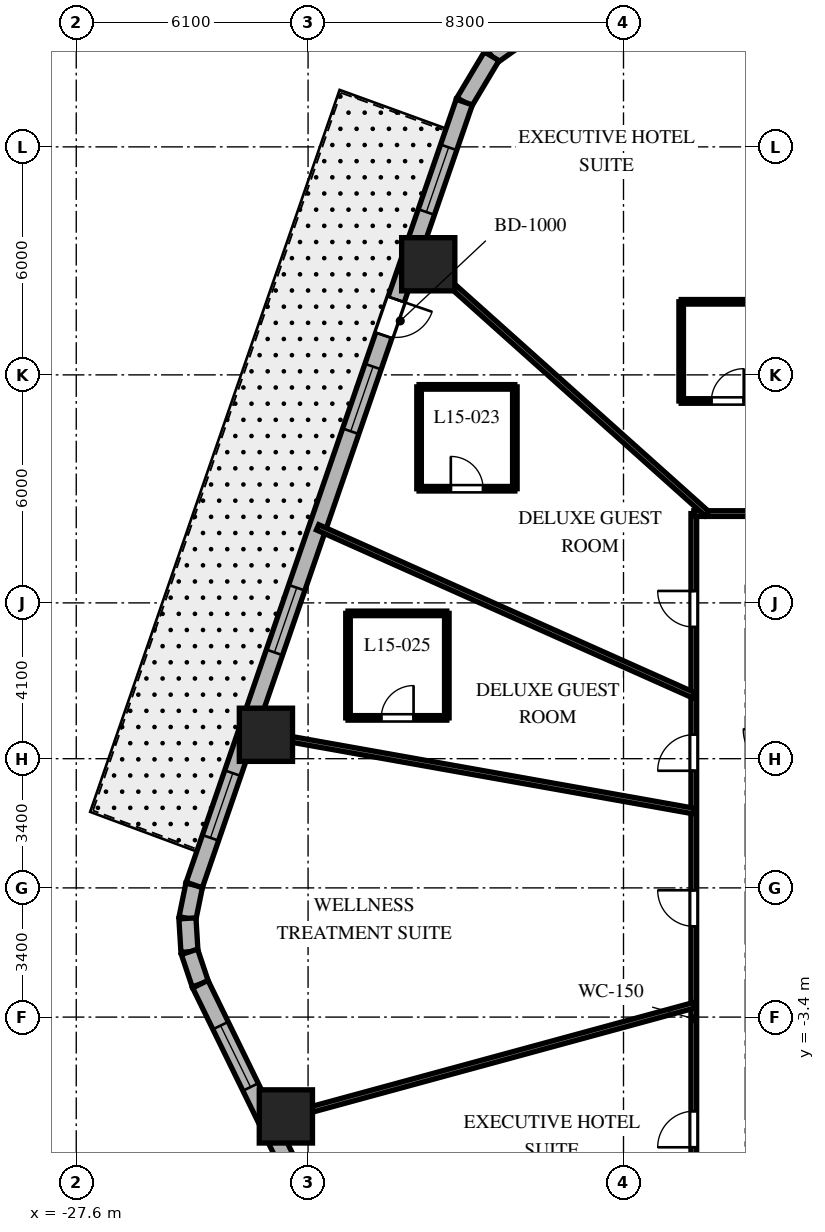
"""IFC4 building model, lengths in metres.
Left out: names, types, materials, properties, quantities, classifications, styles, units other than length and angle.
Written with IfcOpenShell. Run it as: python <this file> out.ifc"""

import sys

from ifc_helpers import new_model, si_unit, direction, frame, frame_2d, origin, origin_2d, place, context, subcontext, project, spatial, rectangle, extrude, element, fill, save


model = new_model("IFC4")
c1 = context("Model", 3, precision=1e-05, world=origin(), true_north=direction((0.0, 1.0)))
c2 = subcontext(c1, "Body", "Model", "MODEL_VIEW")
j1 = project(units=[si_unit("LENGTHUNIT", "METRE"), si_unit("PLANEANGLEUNIT", "RADIAN")], contexts=[c1])
p1 = place(None, origin())
s1 = spatial("IfcSite", under=j1, at=p1, CompositionType="ELEMENT")
p2 = place(p1, origin())
s2 = spatial("IfcBuilding", under=s1, at=p2, CompositionType="ELEMENT")
p3 = place(p2, frame((0.0, 0.0, 67.5)))
s3 = spatial("IfcBuildingStorey", under=s2, at=p3, CompositionType="ELEMENT", Elevation=67.5)
for number, where, z_axis, x_axis in (
    (1, (-18.338, 16.411, 0.0), (0.0, 0.0, 1.0), (1.0, 0.0, 0.0)),
    (2, (-22.609, 4.029, 0.0), (0.0, 0.0, 1.0), (1.0, 0.0, 0.0)),
    (3, (-22.084, -6.014, 0.0), (0.0, 0.0, 1.0), (1.0, 0.0, 0.0)),
):
    element("IfcColumn", number, at=place(p3, frame(where, z_axis=z_axis, x_axis=x_axis)), inside=s3, PredefinedType="COLUMN", context=c2, shape_type="SweptSolid", body=[
        extrude(rectangle(XDim=1.4, YDim=1.4, at=origin_2d()), origin(), (0.0, 0.0, 1.0), 3.7),
    ])
p4 = place(p3, frame((-15.544, 22.687, 0.0), z_axis=(0.0, 0.0, 1.0), x_axis=(-0.814210854316, -0.580569276412, 0.0)))
e4 = element("IfcWall", 4, at=p4, inside=s3, PredefinedType="SOLIDWALL", context=c2, shape_type="SweptSolid", body=[
    extrude(rectangle(XDim=1.381, YDim=0.45, at=frame_2d((0.691, 0.0))), origin(), (0.0, 0.0, 1.0), 3.4),
])
p5 = place(p3, frame((-16.669, 21.885, 0.0), z_axis=(0.0, 0.0, 1.0), x_axis=(-0.512936712947, -0.858426425799, 0.0)))
e5 = element("IfcWall", 5, at=p5, inside=s3, PredefinedType="SOLIDWALL", context=c2, shape_type="SweptSolid", body=[
    extrude(rectangle(XDim=1.406, YDim=0.45, at=frame_2d((0.703, 0.0))), origin(), (0.0, 0.0, 1.0), 3.4),
])
p6 = place(p3, frame((-24.496, 0.077, 0.0), z_axis=(0.0, 0.0, 1.0), x_axis=(-0.199570594521, -0.979883451132, 0.0)))
e6 = element("IfcWall", 6, at=p6, inside=s3, PredefinedType="SOLIDWALL", context=c2, shape_type="SweptSolid", body=[
    extrude(rectangle(XDim=0.897, YDim=0.45, at=frame_2d((0.448, 0.0))), origin(), (0.0, 0.0, 1.0), 3.4),
])
p7 = place(p3, frame((-24.675, -0.802, 0.0), z_axis=(0.0, 0.0, 1.0), x_axis=(0.061188874166, -0.998126205286, 0.0)))
e7 = element("IfcWall", 7, at=p7, inside=s3, PredefinedType="SOLIDWALL", context=c2, shape_type="SweptSolid", body=[
    extrude(rectangle(XDim=0.882, YDim=0.45, at=frame_2d((0.441, 0.0))), origin(), (0.0, 0.0, 1.0), 3.4),
])
p8 = place(p3, frame((-24.621, -1.682, 0.0), z_axis=(0.0, 0.0, 1.0), x_axis=(0.317697451681, -0.948192137278, 0.0)))
e8 = element("IfcWall", 8, at=p8, inside=s3, PredefinedType="SOLIDWALL", context=c2, shape_type="SweptSolid", body=[
    extrude(rectangle(XDim=0.897, YDim=0.45, at=frame_2d((0.448, 0.0))), origin(), (0.0, 0.0, 1.0), 3.4),
])
p9 = place(p3, frame((-17.39, 20.678, 0.0), z_axis=(0.0, 0.0, 1.0), x_axis=(-0.326068018294, -0.945346310854, 0.0)))
e9 = element("IfcWall", 9, at=p9, inside=s3, PredefinedType="SOLIDWALL", context=c2, shape_type="SweptSolid", body=[
    extrude(rectangle(XDim=21.793, YDim=0.45, at=frame_2d((10.896, 0.0))), origin(), (0.0, 0.0, 1.0), 3.4),
])
p10 = place(p9, frame((5.493, 0.0, 0.0)))
e10 = element("IfcOpeningElement", 10, at=p10, cuts=e9, PredefinedType="OPENING", context=c2, shape_type="SweptSolid", body=[
    extrude(rectangle(XDim=1.0, YDim=2.15, at=frame_2d((0.5, 1.075))), frame((0.0, 0.235, 0.0), z_axis=(0.0, -1.0, 0.0), x_axis=(1.0, 0.0, 0.0)), (0.0, 0.0, 1.0), 0.47),
])
p11 = place(p9, frame((1.26, 0.0, 0.8)))
e11 = element("IfcOpeningElement", 11, at=p11, cuts=e9, PredefinedType="OPENING", context=c2, shape_type="SweptSolid", body=[
    extrude(rectangle(XDim=1.8, YDim=1.8, at=frame_2d((0.9, 0.9))), frame((0.0, 0.235, 0.0), z_axis=(0.0, -1.0, 0.0), x_axis=(1.0, 0.0, 0.0)), (0.0, 0.0, 1.0), 0.47),
])
p12 = place(p9, frame((7.363, 0.0, 0.8)))
e12 = element("IfcOpeningElement", 12, at=p12, cuts=e9, PredefinedType="OPENING", context=c2, shape_type="SweptSolid", body=[
    extrude(rectangle(XDim=1.8, YDim=1.8, at=frame_2d((0.9, 0.9))), frame((0.0, 0.235, 0.0), z_axis=(0.0, -1.0, 0.0), x_axis=(1.0, 0.0, 0.0)), (0.0, 0.0, 1.0), 0.47),
])
p13 = place(p9, frame((13.518, 0.0, 0.8)))
e13 = element("IfcOpeningElement", 13, at=p13, cuts=e9, PredefinedType="OPENING", context=c2, shape_type="SweptSolid", body=[
    extrude(rectangle(XDim=1.8, YDim=1.8, at=frame_2d((0.9, 0.9))), frame((0.0, 0.235, 0.0), z_axis=(0.0, -1.0, 0.0), x_axis=(1.0, 0.0, 0.0)), (0.0, 0.0, 1.0), 0.47),
])
p14 = place(p9, frame((18.68, 0.0, 0.8)))
e14 = element("IfcOpeningElement", 14, at=p14, cuts=e9, PredefinedType="OPENING", context=c2, shape_type="SweptSolid", body=[
    extrude(rectangle(XDim=1.8, YDim=1.8, at=frame_2d((0.9, 0.9))), frame((0.0, 0.235, 0.0), z_axis=(0.0, -1.0, 0.0), x_axis=(1.0, 0.0, 0.0)), (0.0, 0.0, 1.0), 0.47),
])
p15 = place(p3, frame((-24.336, -2.532, 0.0), z_axis=(0.0, 0.0, 1.0), x_axis=(0.438931326393, -0.898520612291, 0.0)))
e15 = element("IfcWall", 15, at=p15, inside=s3, PredefinedType="SOLIDWALL", context=c2, shape_type="SweptSolid", body=[
    extrude(rectangle(XDim=20.623, YDim=0.45, at=frame_2d((10.312, 0.0))), origin(), (0.0, 0.0, 1.0), 3.4),
])
p16 = place(p15, frame((1.214, 0.0, 0.8)))
e16 = element("IfcOpeningElement", 16, at=p16, cuts=e15, PredefinedType="OPENING", context=c2, shape_type="SweptSolid", body=[
    extrude(rectangle(XDim=1.8, YDim=1.8, at=frame_2d((0.9, 0.9))), frame((0.0, 0.235, 0.0), z_axis=(0.0, -1.0, 0.0), x_axis=(1.0, 0.0, 0.0)), (0.0, 0.0, 1.0), 0.47),
])
p17 = place(p15, frame((9.462, 0.0, 0.8)))
e17 = element("IfcOpeningElement", 17, at=p17, cuts=e15, PredefinedType="OPENING", context=c2, shape_type="SweptSolid", body=[
    extrude(rectangle(XDim=1.8, YDim=1.8, at=frame_2d((0.9, 0.9))), frame((0.0, 0.235, 0.0), z_axis=(0.0, -1.0, 0.0), x_axis=(1.0, 0.0, 0.0)), (0.0, 0.0, 1.0), 0.47),
])
p18 = place(p15, frame((17.66, 0.0, 0.8)))
e18 = element("IfcOpeningElement", 18, at=p18, cuts=e15, PredefinedType="OPENING", context=c2, shape_type="SweptSolid", body=[
    extrude(rectangle(XDim=1.8, YDim=1.8, at=frame_2d((0.9, 0.9))), frame((0.0, 0.235, 0.0), z_axis=(0.0, -1.0, 0.0), x_axis=(1.0, 0.0, 0.0)), (0.0, 0.0, 1.0), 0.47),
])
p19 = place(p3, frame((-11.35, -9.85, 0.0), z_axis=(0.0, 0.0, 1.0), x_axis=(0.0, 1.0, 0.0)))
e19 = element("IfcWall", 19, at=p19, inside=s3, PredefinedType="PARTITIONING", context=c2, shape_type="SweptSolid", body=[
    extrude(rectangle(XDim=19.7, YDim=0.15, at=frame_2d((9.85, 0.0))), origin(), (0.0, 0.0, 1.0), 2.84),
])
p20 = place(p19, frame((16.714, 0.0, 0.0)))
e20 = element("IfcOpeningElement", 20, at=p20, cuts=e19, PredefinedType="OPENING", context=c2, shape_type="SweptSolid", body=[
    extrude(rectangle(XDim=0.95, YDim=2.03, at=frame_2d((0.475, 1.015))), frame((0.0, 0.085, 0.0), z_axis=(0.0, -1.0, 0.0), x_axis=(1.0, 0.0, 0.0)), (0.0, 0.0, 1.0), 0.17),
])
p21 = place(p19, frame((12.932, 0.0, 0.0)))
e21 = element("IfcOpeningElement", 21, at=p21, cuts=e19, PredefinedType="OPENING", context=c2, shape_type="SweptSolid", body=[
    extrude(rectangle(XDim=0.95, YDim=2.03, at=frame_2d((0.475, 1.015))), frame((0.0, 0.085, 0.0), z_axis=(0.0, -1.0, 0.0), x_axis=(1.0, 0.0, 0.0)), (0.0, 0.0, 1.0), 0.17),
])
p22 = place(p19, frame((8.838, 0.0, 0.0)))
e22 = element("IfcOpeningElement", 22, at=p22, cuts=e19, PredefinedType="OPENING", context=c2, shape_type="SweptSolid", body=[
    extrude(rectangle(XDim=0.95, YDim=2.03, at=frame_2d((0.475, 1.015))), frame((0.0, 0.085, 0.0), z_axis=(0.0, -1.0, 0.0), x_axis=(1.0, 0.0, 0.0)), (0.0, 0.0, 1.0), 0.17),
])
p23 = place(p19, frame((3.024, 0.0, 0.0)))
e23 = element("IfcOpeningElement", 23, at=p23, cuts=e19, PredefinedType="OPENING", context=c2, shape_type="SweptSolid", body=[
    extrude(rectangle(XDim=0.95, YDim=2.03, at=frame_2d((0.475, 1.015))), frame((0.0, 0.085, 0.0), z_axis=(0.0, -1.0, 0.0), x_axis=(1.0, 0.0, 0.0)), (0.0, 0.0, 1.0), 0.17),
])
p24 = place(p3, frame((-11.35, 9.85, 0.0), z_axis=(0.0, 0.0, 1.0), x_axis=(1.0, 0.0, 0.0)))
e24 = element("IfcWall", 24, at=p24, inside=s3, PredefinedType="PARTITIONING", context=c2, shape_type="SweptSolid", body=[
    extrude(rectangle(XDim=22.7, YDim=0.15, at=frame_2d((11.35, 0.0))), origin(), (0.0, 0.0, 1.0), 2.84),
])
p25 = place(p24, frame((17.225, 0.0, 0.0)))
e25 = element("IfcOpeningElement", 25, at=p25, cuts=e24, PredefinedType="OPENING", context=c2, shape_type="SweptSolid", body=[
    extrude(rectangle(XDim=0.95, YDim=2.03, at=frame_2d((0.475, 1.015))), frame((0.0, 0.085, 0.0), z_axis=(0.0, -1.0, 0.0), x_axis=(1.0, 0.0, 0.0)), (0.0, 0.0, 1.0), 0.17),
])
p26 = place(p24, frame((12.415, 0.0, 0.0)))
e26 = element("IfcOpeningElement", 26, at=p26, cuts=e24, PredefinedType="OPENING", context=c2, shape_type="SweptSolid", body=[
    extrude(rectangle(XDim=0.95, YDim=2.03, at=frame_2d((0.475, 1.015))), frame((0.0, 0.085, 0.0), z_axis=(0.0, -1.0, 0.0), x_axis=(1.0, 0.0, 0.0)), (0.0, 0.0, 1.0), 0.17),
])
p27 = place(p24, frame((8.925, 0.0, 0.0)))
e27 = element("IfcOpeningElement", 27, at=p27, cuts=e24, PredefinedType="OPENING", context=c2, shape_type="SweptSolid", body=[
    extrude(rectangle(XDim=0.95, YDim=2.03, at=frame_2d((0.475, 1.015))), frame((0.0, 0.085, 0.0), z_axis=(0.0, -1.0, 0.0), x_axis=(1.0, 0.0, 0.0)), (0.0, 0.0, 1.0), 0.17),
])
p28 = place(p24, frame((3.369, 0.0, 0.0)))
e28 = element("IfcOpeningElement", 28, at=p28, cuts=e24, PredefinedType="OPENING", context=c2, shape_type="SweptSolid", body=[
    extrude(rectangle(XDim=0.95, YDim=2.03, at=frame_2d((0.475, 1.015))), frame((0.0, 0.085, 0.0), z_axis=(0.0, -1.0, 0.0), x_axis=(1.0, 0.0, 0.0)), (0.0, 0.0, 1.0), 0.17),
])
p29 = place(p3, frame((-11.007, 9.85, 0.0), z_axis=(0.0, 0.0, 1.0), x_axis=(-0.745177305978, 0.666866390407, 0.0)))
e29 = element("IfcWall", 29, at=p29, inside=s3, PredefinedType="PARTITIONING", context=c2, shape_type="SweptSolid", body=[
    extrude(rectangle(XDim=10.375, YDim=0.15, at=frame_2d((5.188, 0.0))), origin(), (0.0, 0.0, 1.0), 2.54),
])
p30 = place(p3, frame((-11.35, 5.068, 0.0), z_axis=(0.0, 0.0, 1.0), x_axis=(-0.913107192911, 0.407719577963, 0.0)))
e30 = element("IfcWall", 30, at=p30, inside=s3, PredefinedType="PARTITIONING", context=c2, shape_type="SweptSolid", body=[
    extrude(rectangle(XDim=10.841, YDim=0.15, at=frame_2d((5.421, 0.0))), origin(), (0.0, 0.0, 1.0), 2.54),
])
p31 = place(p3, frame((-11.35, 2.023, 0.0), z_axis=(0.0, 0.0, 1.0), x_axis=(-0.984493741877, 0.17541970301, 0.0)))
e31 = element("IfcWall", 31, at=p31, inside=s3, PredefinedType="PARTITIONING", context=c2, shape_type="SweptSolid", body=[
    extrude(rectangle(XDim=11.937, YDim=0.15, at=frame_2d((5.969, 0.0))), origin(), (0.0, 0.0, 1.0), 2.54),
])
p32 = place(p3, frame((-11.35, -3.091, 0.0), z_axis=(0.0, 0.0, 1.0), x_axis=(-0.964859685283, -0.262765651704, 0.0)))
e32 = element("IfcWall", 32, at=p32, inside=s3, PredefinedType="PARTITIONING", context=c2, shape_type="SweptSolid", body=[
    extrude(rectangle(XDim=11.629, YDim=0.15, at=frame_2d((5.814, 0.0))), origin(), (0.0, 0.0, 1.0), 2.54),
])
p33 = place(p3, frame((-11.682, 12.813, 0.0), z_axis=(0.0, 0.0, 1.0), x_axis=(1.0, 0.0, 0.0)))
e33 = element("IfcWall", 33, at=p33, inside=s3, PredefinedType="PARTITIONING", context=c2, shape_type="SweptSolid", body=[
    extrude(rectangle(XDim=2.44, YDim=0.12, at=frame_2d((1.22, 0.0))), origin(), (0.0, 0.0, 1.0), 2.972),
])
p34 = place(p33, frame((0.795, 0.0, 0.0)))
e34 = element("IfcOpeningElement", 34, at=p34, cuts=e33, PredefinedType="OPENING", context=c2, shape_type="SweptSolid", body=[
    extrude(rectangle(XDim=0.85, YDim=2.03, at=frame_2d((0.425, 1.015))), frame((0.0, 0.07, 0.0), z_axis=(0.0, -1.0, 0.0), x_axis=(1.0, 0.0, 0.0)), (0.0, 0.0, 1.0), 0.14),
])
p35 = place(p3, frame((-9.242, 15.423, 0.0), z_axis=(0.0, 0.0, 1.0), x_axis=(-1.0, 0.0, 0.0)))
e35 = element("IfcWall", 35, at=p35, inside=s3, PredefinedType="PARTITIONING", context=c2, shape_type="SweptSolid", body=[
    extrude(rectangle(XDim=2.44, YDim=0.12, at=frame_2d((1.22, 0.0))), origin(), (0.0, 0.0, 1.0), 3.4),
])
p36 = place(p3, frame((-11.682, 15.423, 0.0), z_axis=(0.0, 0.0, 1.0), x_axis=(0.0, -1.0, 0.0)))
e36 = element("IfcWall", 36, at=p36, inside=s3, PredefinedType="PARTITIONING", context=c2, shape_type="SweptSolid", body=[
    extrude(rectangle(XDim=2.61, YDim=0.12, at=frame_2d((1.305, 0.0))), origin(), (0.0, 0.0, 1.0), 3.4),
])
p37 = place(p3, frame((-18.579, 10.504, 0.0), z_axis=(0.0, 0.0, 1.0), x_axis=(1.0, 0.0, 0.0)))
e37 = element("IfcWall", 37, at=p37, inside=s3, PredefinedType="PARTITIONING", context=c2, shape_type="SweptSolid", body=[
    extrude(rectangle(XDim=2.52, YDim=0.12, at=frame_2d((1.26, 0.0))), origin(), (0.0, 0.0, 1.0), 2.972),
])
p38 = place(p37, frame((0.835, 0.0, 0.0)))
e38 = element("IfcOpeningElement", 38, at=p38, cuts=e37, PredefinedType="OPENING", context=c2, shape_type="SweptSolid", body=[
    extrude(rectangle(XDim=0.85, YDim=2.03, at=frame_2d((0.425, 1.015))), frame((0.0, 0.07, 0.0), z_axis=(0.0, -1.0, 0.0), x_axis=(1.0, 0.0, 0.0)), (0.0, 0.0, 1.0), 0.14),
])
p39 = place(p3, frame((-16.059, 10.504, 0.0), z_axis=(0.0, 0.0, 1.0), x_axis=(0.0, 1.0, 0.0)))
e39 = element("IfcWall", 39, at=p39, inside=s3, PredefinedType="PARTITIONING", context=c2, shape_type="SweptSolid", body=[
    extrude(rectangle(XDim=2.68, YDim=0.12, at=frame_2d((1.34, 0.0))), origin(), (0.0, 0.0, 1.0), 2.972),
])
p40 = place(p3, frame((-16.059, 13.184, 0.0), z_axis=(0.0, 0.0, 1.0), x_axis=(-1.0, 0.0, 0.0)))
e40 = element("IfcWall", 40, at=p40, inside=s3, PredefinedType="PARTITIONING", context=c2, shape_type="SweptSolid", body=[
    extrude(rectangle(XDim=2.52, YDim=0.12, at=frame_2d((1.26, 0.0))), origin(), (0.0, 0.0, 1.0), 3.4),
])
p41 = place(p3, frame((-18.579, 13.184, 0.0), z_axis=(0.0, 0.0, 1.0), x_axis=(0.0, -1.0, 0.0)))
e41 = element("IfcWall", 41, at=p41, inside=s3, PredefinedType="PARTITIONING", context=c2, shape_type="SweptSolid", body=[
    extrude(rectangle(XDim=2.68, YDim=0.12, at=frame_2d((1.34, 0.0))), origin(), (0.0, 0.0, 1.0), 3.4),
])
p42 = place(p3, frame((-20.449, 4.474, 0.0), z_axis=(0.0, 0.0, 1.0), x_axis=(1.0, 0.0, 0.0)))
e42 = element("IfcWall", 42, at=p42, inside=s3, PredefinedType="PARTITIONING", context=c2, shape_type="SweptSolid", body=[
    extrude(rectangle(XDim=2.6, YDim=0.12, at=frame_2d((1.3, 0.0))), origin(), (0.0, 0.0, 1.0), 2.84),
])
p43 = place(p42, frame((0.875, 0.0, 0.0)))
e43 = element("IfcOpeningElement", 43, at=p43, cuts=e42, PredefinedType="OPENING", context=c2, shape_type="SweptSolid", body=[
    extrude(rectangle(XDim=0.85, YDim=2.03, at=frame_2d((0.425, 1.015))), frame((0.0, 0.07, 0.0), z_axis=(0.0, -1.0, 0.0), x_axis=(1.0, 0.0, 0.0)), (0.0, 0.0, 1.0), 0.14),
])
p44 = place(p3, frame((-17.849, 4.474, 0.0), z_axis=(0.0, 0.0, 1.0), x_axis=(0.0, 1.0, 0.0)))
e44 = element("IfcWall", 44, at=p44, inside=s3, PredefinedType="PARTITIONING", context=c2, shape_type="SweptSolid", body=[
    extrude(rectangle(XDim=2.75, YDim=0.12, at=frame_2d((1.375, 0.0))), origin(), (0.0, 0.0, 1.0), 2.84),
])
p45 = place(p3, frame((-17.849, 7.224, 0.0), z_axis=(0.0, 0.0, 1.0), x_axis=(-1.0, 0.0, 0.0)))
e45 = element("IfcWall", 45, at=p45, inside=s3, PredefinedType="PARTITIONING", context=c2, shape_type="SweptSolid", body=[
    extrude(rectangle(XDim=2.6, YDim=0.12, at=frame_2d((1.3, 0.0))), origin(), (0.0, 0.0, 1.0), 3.4),
])
p46 = place(p3, frame((-20.449, 7.224, 0.0), z_axis=(0.0, 0.0, 1.0), x_axis=(0.0, -1.0, 0.0)))
e46 = element("IfcWall", 46, at=p46, inside=s3, PredefinedType="PARTITIONING", context=c2, shape_type="SweptSolid", body=[
    extrude(rectangle(XDim=2.75, YDim=0.12, at=frame_2d((1.375, 0.0))), origin(), (0.0, 0.0, 1.0), 2.84),
])
p47 = place(p10, origin())
e47 = element("IfcDoor", 47, at=p47, inside=s3, OperationType="SINGLE_SWING_LEFT", PredefinedType="DOOR", context=c2, shape_type="SweptSolid", body=[
    extrude(rectangle(XDim=1.0, YDim=2.15, at=frame_2d((0.5, 1.075))), frame((0.0, 0.025, 0.0), z_axis=(0.0, -1.0, 0.0), x_axis=(1.0, 0.0, 0.0)), (0.0, 0.0, 1.0), 0.05),
])
fill(e10, e47)
p48 = place(p11, origin())
e48 = element("IfcWindow", 48, at=p48, inside=s3, PartitioningType="SINGLE_PANEL", PredefinedType="WINDOW", context=c2, shape_type="SweptSolid", body=[
    extrude(rectangle(XDim=1.8, YDim=1.8, at=frame_2d((0.9, 0.9))), frame((0.0, 0.03, 0.0), z_axis=(0.0, -1.0, 0.0), x_axis=(1.0, 0.0, 0.0)), (0.0, 0.0, 1.0), 0.06),
])
fill(e11, e48)
p49 = place(p12, origin())
e49 = element("IfcWindow", 49, at=p49, inside=s3, PartitioningType="SINGLE_PANEL", PredefinedType="WINDOW", context=c2, shape_type="SweptSolid", body=[
    extrude(rectangle(XDim=1.8, YDim=1.8, at=frame_2d((0.9, 0.9))), frame((0.0, 0.03, 0.0), z_axis=(0.0, -1.0, 0.0), x_axis=(1.0, 0.0, 0.0)), (0.0, 0.0, 1.0), 0.06),
])
fill(e12, e49)
p50 = place(p13, origin())
e50 = element("IfcWindow", 50, at=p50, inside=s3, PartitioningType="SINGLE_PANEL", PredefinedType="WINDOW", context=c2, shape_type="SweptSolid", body=[
    extrude(rectangle(XDim=1.8, YDim=1.8, at=frame_2d((0.9, 0.9))), frame((0.0, 0.03, 0.0), z_axis=(0.0, -1.0, 0.0), x_axis=(1.0, 0.0, 0.0)), (0.0, 0.0, 1.0), 0.06),
])
fill(e13, e50)
p51 = place(p14, origin())
e51 = element("IfcWindow", 51, at=p51, inside=s3, PartitioningType="SINGLE_PANEL", PredefinedType="WINDOW", context=c2, shape_type="SweptSolid", body=[
    extrude(rectangle(XDim=1.8, YDim=1.8, at=frame_2d((0.9, 0.9))), frame((0.0, 0.03, 0.0), z_axis=(0.0, -1.0, 0.0), x_axis=(1.0, 0.0, 0.0)), (0.0, 0.0, 1.0), 0.06),
])
fill(e14, e51)
p52 = place(p16, origin())
e52 = element("IfcWindow", 52, at=p52, inside=s3, PartitioningType="SINGLE_PANEL", PredefinedType="WINDOW", context=c2, shape_type="SweptSolid", body=[
    extrude(rectangle(XDim=1.8, YDim=1.8, at=frame_2d((0.9, 0.9))), frame((0.0, 0.03, 0.0), z_axis=(0.0, -1.0, 0.0), x_axis=(1.0, 0.0, 0.0)), (0.0, 0.0, 1.0), 0.06),
])
fill(e16, e52)
p53 = place(p34, origin())
e53 = element("IfcDoor", 53, at=p53, inside=s3, OperationType="SINGLE_SWING_RIGHT", PredefinedType="DOOR", context=c2, shape_type="SweptSolid", body=[
    extrude(rectangle(XDim=0.85, YDim=2.03, at=frame_2d((0.425, 1.015))), frame((0.0, 0.025, 0.0), z_axis=(0.0, -1.0, 0.0), x_axis=(1.0, 0.0, 0.0)), (0.0, 0.0, 1.0), 0.05),
])
fill(e34, e53)
p54 = place(p20, origin())
e54 = element("IfcDoor", 54, at=p54, inside=s3, OperationType="SINGLE_SWING_RIGHT", PredefinedType="DOOR", context=c2, shape_type="SweptSolid", body=[
    extrude(rectangle(XDim=0.95, YDim=2.03, at=frame_2d((0.475, 1.015))), frame((0.0, 0.025, 0.0), z_axis=(0.0, -1.0, 0.0), x_axis=(1.0, 0.0, 0.0)), (0.0, 0.0, 1.0), 0.05),
])
fill(e20, e54)
p55 = place(p38, origin())
e55 = element("IfcDoor", 55, at=p55, inside=s3, OperationType="SINGLE_SWING_LEFT", PredefinedType="DOOR", context=c2, shape_type="SweptSolid", body=[
    extrude(rectangle(XDim=0.85, YDim=2.03, at=frame_2d((0.425, 1.015))), frame((0.0, 0.025, 0.0), z_axis=(0.0, -1.0, 0.0), x_axis=(1.0, 0.0, 0.0)), (0.0, 0.0, 1.0), 0.05),
])
fill(e38, e55)
p56 = place(p21, origin())
e56 = element("IfcDoor", 56, at=p56, inside=s3, OperationType="SINGLE_SWING_LEFT", PredefinedType="DOOR", context=c2, shape_type="SweptSolid", body=[
    extrude(rectangle(XDim=0.95, YDim=2.03, at=frame_2d((0.475, 1.015))), frame((0.0, 0.025, 0.0), z_axis=(0.0, -1.0, 0.0), x_axis=(1.0, 0.0, 0.0)), (0.0, 0.0, 1.0), 0.05),
])
fill(e21, e56)
p57 = place(p43, origin())
e57 = element("IfcDoor", 57, at=p57, inside=s3, OperationType="SINGLE_SWING_RIGHT", PredefinedType="DOOR", context=c2, shape_type="SweptSolid", body=[
    extrude(rectangle(XDim=0.85, YDim=2.03, at=frame_2d((0.425, 1.015))), frame((0.0, 0.025, 0.0), z_axis=(0.0, -1.0, 0.0), x_axis=(1.0, 0.0, 0.0)), (0.0, 0.0, 1.0), 0.05),
])
fill(e43, e57)
p58 = place(p22, origin())
e58 = element("IfcDoor", 58, at=p58, inside=s3, OperationType="SINGLE_SWING_RIGHT", PredefinedType="DOOR", context=c2, shape_type="SweptSolid", body=[
    extrude(rectangle(XDim=0.95, YDim=2.03, at=frame_2d((0.475, 1.015))), frame((0.0, 0.025, 0.0), z_axis=(0.0, -1.0, 0.0), x_axis=(1.0, 0.0, 0.0)), (0.0, 0.0, 1.0), 0.05),
])
fill(e22, e58)
p59 = place(p23, origin())
e59 = element("IfcDoor", 59, at=p59, inside=s3, OperationType="SINGLE_SWING_LEFT", PredefinedType="DOOR", context=c2, shape_type="SweptSolid", body=[
    extrude(rectangle(XDim=0.95, YDim=2.03, at=frame_2d((0.475, 1.015))), frame((0.0, 0.025, 0.0), z_axis=(0.0, -1.0, 0.0), x_axis=(1.0, 0.0, 0.0)), (0.0, 0.0, 1.0), 0.05),
])
fill(e23, e59)
save(model, sys.argv[1])
